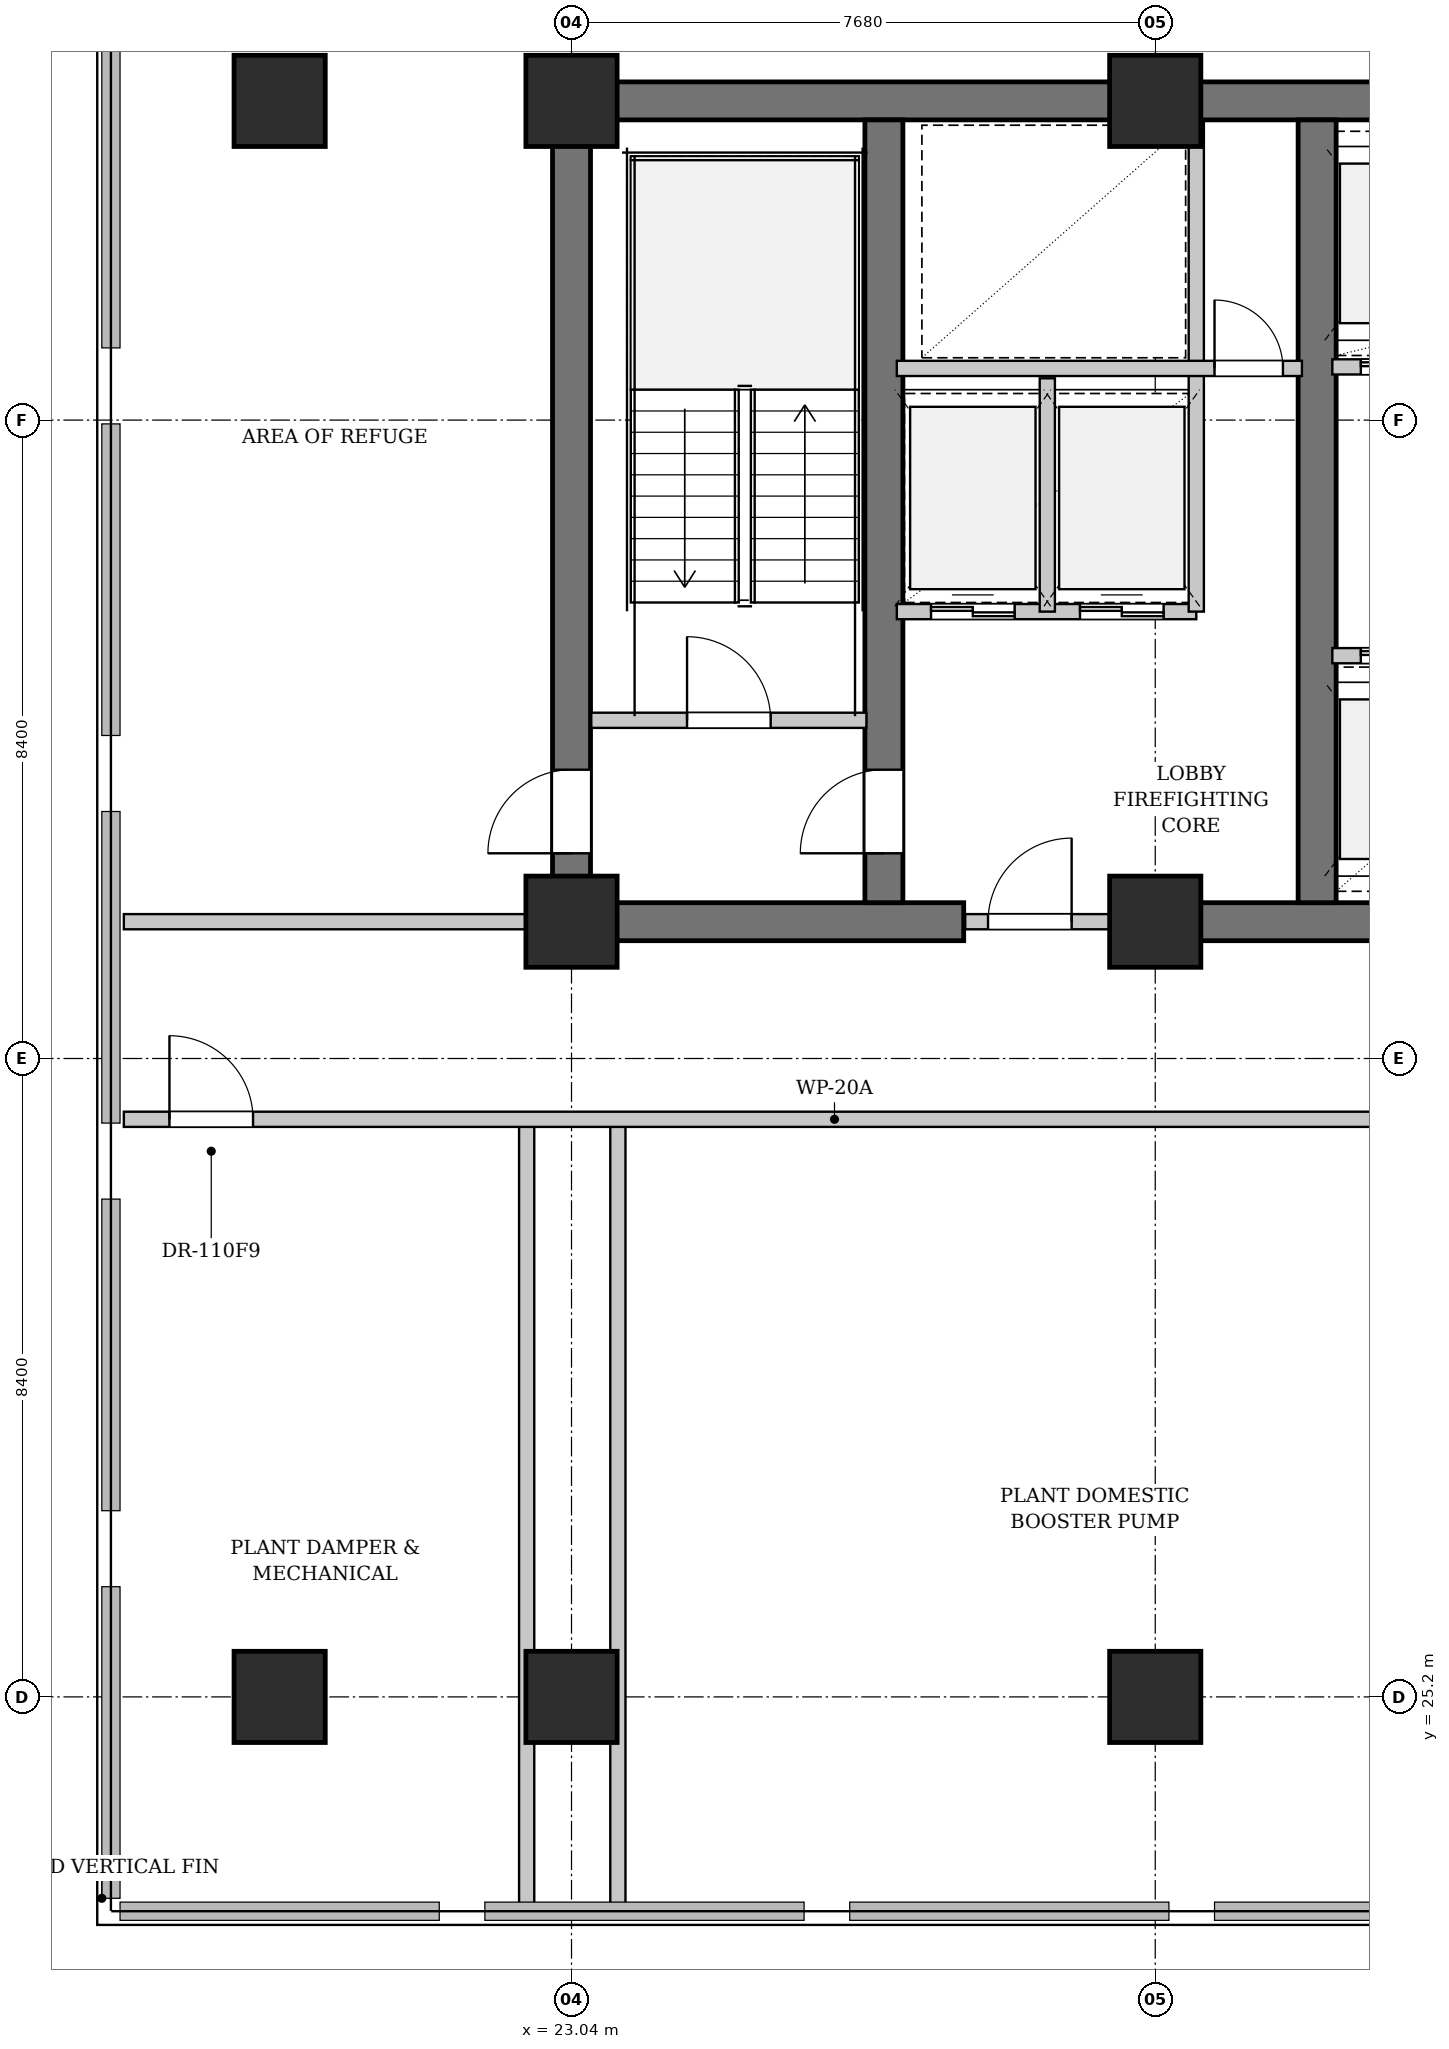
"""IFC4 building model, lengths in metres.
Left out: names, types, materials, properties, quantities, classifications, styles, units other than length and angle.
Written with IfcOpenShell. Run it as: python <this file> out.ifc"""

import sys

from ifc_helpers import new_model, si_unit, direction, frame, frame_2d, origin, origin_2d, place, context, subcontext, project, spatial, rectangle, extrude, element, fill, save


model = new_model("IFC4")
c1 = context("Model", 3, precision=1e-05, world=origin(), true_north=direction((0.0, 1.0)))
c2 = subcontext(c1, "Body", "Model", "MODEL_VIEW")
j1 = project(units=[si_unit("LENGTHUNIT", "METRE"), si_unit("PLANEANGLEUNIT", "RADIAN")], contexts=[c1])
p1 = place(None, origin())
s1 = spatial("IfcSite", under=j1, at=p1, CompositionType="ELEMENT")
p2 = place(p1, origin())
s2 = spatial("IfcBuilding", under=s1, at=p2, CompositionType="ELEMENT")
p3 = place(p2, frame((0.0, 0.0, 85.8)))
s3 = spatial("IfcBuildingStorey", under=s2, at=p3, CompositionType="ELEMENT", Elevation=85.8)
p4 = place(p3, frame((22.79, 46.2, 0.0), z_axis=(0.0, 0.0, 1.0), x_axis=(1.0, 0.0, 0.0)))
e1 = element("IfcWall", 1, at=p4, inside=s3, PredefinedType="SHEAR", context=c2, shape_type="SweptSolid", body=[
    extrude(rectangle(XDim=31.22, YDim=0.5, at=frame_2d((15.61, 0.0))), origin(), (0.0, 0.0, 1.0), 3.48),
])
p5 = place(p3, frame((22.79, 35.4, 0.0), z_axis=(0.0, 0.0, 1.0), x_axis=(1.0, 0.0, 0.0)))
e2 = element("IfcWall", 2, at=p5, inside=s3, PredefinedType="SHEAR", context=c2, shape_type="SweptSolid", body=[
    extrude(rectangle(XDim=5.41, YDim=0.5, at=frame_2d((2.705, 0.0))), origin(), (0.0, 0.0, 1.0), 3.48),
])
p6 = place(p3, frame((30.72, 35.4, 0.0), z_axis=(0.0, 0.0, 1.0), x_axis=(1.0, 0.0, 0.0)))
e3 = element("IfcWall", 3, at=p6, inside=s3, PredefinedType="SHEAR", context=c2, shape_type="SweptSolid", body=[
    extrude(rectangle(XDim=4.88, YDim=0.5, at=frame_2d((2.44, 0.0))), origin(), (0.0, 0.0, 1.0), 3.48),
])
p7 = place(p3, frame((23.04, 35.65, 0.0), z_axis=(0.0, 0.0, 1.0), x_axis=(0.0, 1.0, 0.0)))
e4 = element("IfcWall", 4, at=p7, inside=s3, PredefinedType="SHEAR", context=c2, shape_type="SweptSolid", body=[
    extrude(rectangle(XDim=10.3, YDim=0.5, at=frame_2d((5.15, 0.0))), origin(), (0.0, 0.0, 1.0), 3.48),
])
p8 = place(p7, frame((0.65, 0.0, 0.0)))
e5 = element("IfcOpeningElement", 5, at=p8, cuts=e4, PredefinedType="OPENING", context=c2, shape_type="SweptSolid", body=[
    extrude(rectangle(XDim=1.1, YDim=2.15, at=frame_2d((0.55, 1.075))), frame((0.0, 0.26, 0.0), z_axis=(0.0, -1.0, 0.0), x_axis=(1.0, 0.0, 0.0)), (0.0, 0.0, 1.0), 0.52),
])
p9 = place(p3, frame((27.15, 35.65, 0.0), z_axis=(0.0, 0.0, 1.0), x_axis=(0.0, 1.0, 0.0)))
e6 = element("IfcWall", 6, at=p9, inside=s3, PredefinedType="SHEAR", context=c2, shape_type="SweptSolid", body=[
    extrude(rectangle(XDim=10.3, YDim=0.5, at=frame_2d((5.15, 0.0))), origin(), (0.0, 0.0, 1.0), 3.48),
])
p10 = place(p9, frame((0.65, 0.0, 0.0)))
e7 = element("IfcOpeningElement", 7, at=p10, cuts=e6, PredefinedType="OPENING", context=c2, shape_type="SweptSolid", body=[
    extrude(rectangle(XDim=1.1, YDim=2.15, at=frame_2d((0.55, 1.075))), frame((0.0, 0.26, 0.0), z_axis=(0.0, -1.0, 0.0), x_axis=(1.0, 0.0, 0.0)), (0.0, 0.0, 1.0), 0.52),
])
p11 = place(p3, frame((32.85, 35.65, 0.0), z_axis=(0.0, 0.0, 1.0), x_axis=(0.0, 1.0, 0.0)))
e8 = element("IfcWall", 8, at=p11, inside=s3, PredefinedType="SHEAR", context=c2, shape_type="SweptSolid", body=[
    extrude(rectangle(XDim=10.3, YDim=0.5, at=frame_2d((5.15, 0.0))), origin(), (0.0, 0.0, 1.0), 3.48),
])
for number, where, z_axis, x_axis in (
    (9, (23.04, 35.4, 0.0), (0.0, 0.0, 1.0), (1.0, 0.0, 0.0)),
    (10, (23.04, 46.2, 0.0), (0.0, 0.0, 1.0), (1.0, 0.0, 0.0)),
    (11, (23.04, 25.2, 0.0), (0.0, 0.0, 1.0), (1.0, 0.0, 0.0)),
    (12, (30.72, 35.4, 0.0), (0.0, 0.0, 1.0), (1.0, 0.0, 0.0)),
    (13, (30.72, 46.2, 0.0), (0.0, 0.0, 1.0), (1.0, 0.0, 0.0)),
    (14, (30.72, 25.2, 0.0), (0.0, 0.0, 1.0), (1.0, 0.0, 0.0)),
    (15, (19.2, 25.2, 0.0), (0.0, 0.0, 1.0), (1.0, 0.0, 0.0)),
    (16, (19.2, 46.2, 0.0), (0.0, 0.0, 1.0), (1.0, 0.0, 0.0)),
):
    element("IfcColumn", number, at=place(p3, frame(where, z_axis=z_axis, x_axis=x_axis)), inside=s3, PredefinedType="COLUMN", context=c2, shape_type="SweptSolid", body=[
        extrude(rectangle(XDim=1.2, YDim=1.2, at=origin_2d()), origin(), (0.0, 0.0, 1.0), 3.9),
    ])
p12 = place(p3, frame((23.3, 38.05, 0.0), z_axis=(0.0, 0.0, 1.0), x_axis=(1.0, 0.0, 0.0)))
e17 = element("IfcWall", 17, at=p12, inside=s3, PredefinedType="PARTITIONING", context=c2, shape_type="SweptSolid", body=[
    extrude(rectangle(XDim=3.62, YDim=0.2, at=frame_2d((1.81, 0.0))), origin(), (0.0, 0.0, 1.0), 3.48),
])
p13 = place(p12, frame((1.26, 0.0, 0.0)))
e18 = element("IfcOpeningElement", 18, at=p13, cuts=e17, PredefinedType="OPENING", context=c2, shape_type="SweptSolid", body=[
    extrude(rectangle(XDim=1.1, YDim=2.15, at=frame_2d((0.55, 1.075))), frame((0.0, 0.11, 0.0), z_axis=(0.0, -1.0, 0.0), x_axis=(1.0, 0.0, 0.0)), (0.0, 0.0, 1.0), 0.22),
])
p14 = place(p3, frame((28.22, 35.4, 0.0), z_axis=(0.0, 0.0, 1.0), x_axis=(1.0, 0.0, 0.0)))
e19 = element("IfcWall", 19, at=p14, inside=s3, PredefinedType="PARTITIONING", context=c2, shape_type="SweptSolid", body=[
    extrude(rectangle(XDim=2.5, YDim=0.2, at=frame_2d((1.25, 0.0))), origin(), (0.0, 0.0, 1.0), 2.565),
])
p15 = place(p14, frame((0.3, 0.0, 0.0)))
e20 = element("IfcOpeningElement", 20, at=p15, cuts=e19, PredefinedType="OPENING", context=c2, shape_type="SweptSolid", body=[
    extrude(rectangle(XDim=1.1, YDim=2.15, at=frame_2d((0.55, 1.075))), frame((0.0, 0.11, 0.0), z_axis=(0.0, -1.0, 0.0), x_axis=(1.0, 0.0, 0.0)), (0.0, 0.0, 1.0), 0.22),
])
p16 = place(p3, frame((27.32, 39.48, 0.0), z_axis=(0.0, 0.0, 1.0), x_axis=(1.0, 0.0, 0.0)))
e21 = element("IfcWall", 21, at=p16, inside=s3, PredefinedType="PARTITIONING", context=c2, shape_type="SweptSolid", body=[
    extrude(rectangle(XDim=3.94, YDim=0.2, at=frame_2d((1.97, 0.0))), origin(), (0.0, 0.0, 1.0), 3.48),
])
p17 = place(p16, frame((0.45, 0.0, 0.0)))
e22 = element("IfcOpeningElement", 22, at=p17, cuts=e21, PredefinedType="OPENING", context=c2, shape_type="SweptSolid", body=[
    extrude(rectangle(XDim=1.1, YDim=2.2, at=frame_2d((0.55, 1.1))), frame((0.0, 0.11, 0.0), z_axis=(0.0, -1.0, 0.0), x_axis=(1.0, 0.0, 0.0)), (0.0, 0.0, 1.0), 0.22),
])
p18 = place(p16, frame((2.41, 0.0, 0.0)))
e23 = element("IfcOpeningElement", 23, at=p18, cuts=e21, PredefinedType="OPENING", context=c2, shape_type="SweptSolid", body=[
    extrude(rectangle(XDim=1.1, YDim=2.2, at=frame_2d((0.55, 1.1))), frame((0.0, 0.11, 0.0), z_axis=(0.0, -1.0, 0.0), x_axis=(1.0, 0.0, 0.0)), (0.0, 0.0, 1.0), 0.22),
])
p19 = place(p3, frame((29.3, 39.48, 0.0), z_axis=(0.0, 0.0, 1.0), x_axis=(0.0, 1.0, 0.0)))
e24 = element("IfcWall", 24, at=p19, inside=s3, PredefinedType="PARTITIONING", context=c2, shape_type="SweptSolid", body=[
    extrude(rectangle(XDim=3.07, YDim=0.2, at=frame_2d((1.535, 0.0))), origin(), (0.0, 0.0, 1.0), 3.48),
])
p20 = place(p3, frame((31.26, 39.48, 0.0), z_axis=(0.0, 0.0, 1.0), x_axis=(0.0, 1.0, 0.0)))
e25 = element("IfcWall", 25, at=p20, inside=s3, PredefinedType="PARTITIONING", context=c2, shape_type="SweptSolid", body=[
    extrude(rectangle(XDim=6.44, YDim=0.2, at=frame_2d((3.22, 0.0))), origin(), (0.0, 0.0, 1.0), 3.48),
])
p21 = place(p3, frame((27.32, 42.68, 0.0), z_axis=(0.0, 0.0, 1.0), x_axis=(1.0, 0.0, 0.0)))
e26 = element("IfcWall", 26, at=p21, inside=s3, PredefinedType="PARTITIONING", context=c2, shape_type="SweptSolid", body=[
    extrude(rectangle(XDim=5.33, YDim=0.2, at=frame_2d((2.665, 0.0))), origin(), (0.0, 0.0, 1.0), 3.48),
])
p22 = place(p21, frame((4.18, 0.0, 0.0)))
e27 = element("IfcOpeningElement", 27, at=p22, cuts=e26, PredefinedType="OPENING", context=c2, shape_type="SweptSolid", body=[
    extrude(rectangle(XDim=0.9, YDim=2.15, at=frame_2d((0.45, 1.075))), frame((0.0, 0.11, 0.0), z_axis=(0.0, -1.0, 0.0), x_axis=(1.0, 0.0, 0.0)), (0.0, 0.0, 1.0), 0.22),
])
p23 = place(p3, frame((33.05, 38.9, 0.0), z_axis=(0.0, 0.0, 1.0), x_axis=(1.0, 0.0, 0.0)))
e28 = element("IfcWall", 28, at=p23, inside=s3, PredefinedType="PARTITIONING", context=c2, shape_type="SweptSolid", body=[
    extrude(rectangle(XDim=3.57, YDim=0.2, at=frame_2d((1.785, 0.0))), origin(), (0.0, 0.0, 1.0), 3.48),
])
p24 = place(p23, frame((0.375, 0.0, 0.0)))
e29 = element("IfcOpeningElement", 29, at=p24, cuts=e28, PredefinedType="OPENING", context=c2, shape_type="SweptSolid", body=[
    extrude(rectangle(XDim=1.0, YDim=2.2, at=frame_2d((0.5, 1.1))), frame((0.0, 0.11, 0.0), z_axis=(0.0, -1.0, 0.0), x_axis=(1.0, 0.0, 0.0)), (0.0, 0.0, 1.0), 0.22),
])
p25 = place(p23, frame((2.125, 0.0, 0.0)))
e30 = element("IfcOpeningElement", 30, at=p25, cuts=e28, PredefinedType="OPENING", context=c2, shape_type="SweptSolid", body=[
    extrude(rectangle(XDim=1.0, YDim=2.2, at=frame_2d((0.5, 1.1))), frame((0.0, 0.11, 0.0), z_axis=(0.0, -1.0, 0.0), x_axis=(1.0, 0.0, 0.0)), (0.0, 0.0, 1.0), 0.22),
])
p26 = place(p3, frame((33.05, 42.7, 0.0), z_axis=(0.0, 0.0, 1.0), x_axis=(1.0, 0.0, 0.0)))
e31 = element("IfcWall", 31, at=p26, inside=s3, PredefinedType="PARTITIONING", context=c2, shape_type="SweptSolid", body=[
    extrude(rectangle(XDim=3.57, YDim=0.2, at=frame_2d((1.785, 0.0))), origin(), (0.0, 0.0, 1.0), 3.48),
])
p27 = place(p26, frame((0.375, 0.0, 0.0)))
e32 = element("IfcOpeningElement", 32, at=p27, cuts=e31, PredefinedType="OPENING", context=c2, shape_type="SweptSolid", body=[
    extrude(rectangle(XDim=1.0, YDim=2.2, at=frame_2d((0.5, 1.1))), frame((0.0, 0.11, 0.0), z_axis=(0.0, -1.0, 0.0), x_axis=(1.0, 0.0, 0.0)), (0.0, 0.0, 1.0), 0.22),
])
p28 = place(p26, frame((2.125, 0.0, 0.0)))
e33 = element("IfcOpeningElement", 33, at=p28, cuts=e31, PredefinedType="OPENING", context=c2, shape_type="SweptSolid", body=[
    extrude(rectangle(XDim=1.0, YDim=2.2, at=frame_2d((0.5, 1.1))), frame((0.0, 0.11, 0.0), z_axis=(0.0, -1.0, 0.0), x_axis=(1.0, 0.0, 0.0)), (0.0, 0.0, 1.0), 0.22),
])
p29 = place(p3, frame((17.15, 35.4, 0.0), z_axis=(0.0, 0.0, 1.0), x_axis=(1.0, 0.0, 0.0)))
e34 = element("IfcWall", 34, at=p29, inside=s3, PredefinedType="PARTITIONING", context=c2, shape_type="SweptSolid", body=[
    extrude(rectangle(XDim=5.6, YDim=0.2, at=frame_2d((2.8, 0.0))), origin(), (0.0, 0.0, 1.0), 3.48),
])
p30 = place(p3, frame((22.45, 22.38, 0.0), z_axis=(0.0, 0.0, 1.0), x_axis=(0.0, 1.0, 0.0)))
e35 = element("IfcWall", 35, at=p30, inside=s3, PredefinedType="PARTITIONING", context=c2, shape_type="SweptSolid", body=[
    extrude(rectangle(XDim=10.42, YDim=0.2, at=frame_2d((5.21, 0.0))), origin(), (0.0, 0.0, 1.0), 2.275),
])
p31 = place(p3, frame((23.65, 22.38, 0.0), z_axis=(0.0, 0.0, 1.0), x_axis=(0.0, 1.0, 0.0)))
e36 = element("IfcWall", 36, at=p31, inside=s3, PredefinedType="PARTITIONING", context=c2, shape_type="SweptSolid", body=[
    extrude(rectangle(XDim=10.42, YDim=0.2, at=frame_2d((5.21, 0.0))), origin(), (0.0, 0.0, 1.0), 3.48),
])
p32 = place(p3, frame((17.15, 32.8, 0.0), z_axis=(0.0, 0.0, 1.0), x_axis=(1.0, 0.0, 0.0)))
e37 = element("IfcWall", 37, at=p32, inside=s3, PredefinedType="PARTITIONING", context=c2, shape_type="SweptSolid", body=[
    extrude(rectangle(XDim=42.5, YDim=0.2, at=frame_2d((21.25, 0.0))), origin(), (0.0, 0.0, 1.0), 2.275),
])
p33 = place(p32, frame((0.6, 0.0, 0.0)))
e38 = element("IfcOpeningElement", 38, at=p33, cuts=e37, PredefinedType="OPENING", context=c2, shape_type="SweptSolid", body=[
    extrude(rectangle(XDim=1.1, YDim=2.15, at=frame_2d((0.55, 1.075))), frame((0.0, 0.11, 0.0), z_axis=(0.0, -1.0, 0.0), x_axis=(1.0, 0.0, 0.0)), (0.0, 0.0, 1.0), 0.22),
])
p34 = place(p32, frame((16.862, 0.0, 0.0)))
e39 = element("IfcOpeningElement", 39, at=p34, cuts=e37, PredefinedType="OPENING", context=c2, shape_type="SweptSolid", body=[
    extrude(rectangle(XDim=1.1, YDim=2.15, at=frame_2d((0.55, 1.075))), frame((0.0, 0.11, 0.0), z_axis=(0.0, -1.0, 0.0), x_axis=(1.0, 0.0, 0.0)), (0.0, 0.0, 1.0), 0.22),
])
p35 = place(p32, frame((32.235, 0.0, 0.0)))
e40 = element("IfcOpeningElement", 40, at=p35, cuts=e37, PredefinedType="OPENING", context=c2, shape_type="SweptSolid", body=[
    extrude(rectangle(XDim=1.1, YDim=2.15, at=frame_2d((0.55, 1.075))), frame((0.0, 0.11, 0.0), z_axis=(0.0, -1.0, 0.0), x_axis=(1.0, 0.0, 0.0)), (0.0, 0.0, 1.0), 0.22),
])
p36 = place(p32, frame((40.8, 0.0, 0.0)))
e41 = element("IfcOpeningElement", 41, at=p36, cuts=e37, PredefinedType="OPENING", context=c2, shape_type="SweptSolid", body=[
    extrude(rectangle(XDim=1.1, YDim=2.15, at=frame_2d((0.55, 1.075))), frame((0.0, 0.11, 0.0), z_axis=(0.0, -1.0, 0.0), x_axis=(1.0, 0.0, 0.0)), (0.0, 0.0, 1.0), 0.22),
])
p37 = place(p13, origin())
e42 = element("IfcDoor", 42, at=p37, inside=s3, OperationType="SINGLE_SWING_LEFT", PredefinedType="DOOR", context=c2, shape_type="SweptSolid", body=[
    extrude(rectangle(XDim=1.1, YDim=2.15, at=frame_2d((0.55, 1.075))), frame((0.0, 0.025, 0.0), z_axis=(0.0, -1.0, 0.0), x_axis=(1.0, 0.0, 0.0)), (0.0, 0.0, 1.0), 0.05),
])
fill(e18, e42)
p38 = place(p15, origin())
e43 = element("IfcDoor", 43, at=p38, inside=s3, OperationType="SINGLE_SWING_RIGHT", PredefinedType="DOOR", context=c2, shape_type="SweptSolid", body=[
    extrude(rectangle(XDim=1.1, YDim=2.15, at=frame_2d((0.55, 1.075))), frame((0.0, 0.025, 0.0), z_axis=(0.0, -1.0, 0.0), x_axis=(1.0, 0.0, 0.0)), (0.0, 0.0, 1.0), 0.05),
])
fill(e20, e43)
p39 = place(p17, origin())
e44 = element("IfcDoor", 44, at=p39, inside=s3, OperationType="DOUBLE_DOOR_SLIDING", PredefinedType="DOOR", context=c2, shape_type="SweptSolid", body=[
    extrude(rectangle(XDim=1.1, YDim=2.2, at=frame_2d((0.55, 1.1))), frame((0.0, 0.025, 0.0), z_axis=(0.0, -1.0, 0.0), x_axis=(1.0, 0.0, 0.0)), (0.0, 0.0, 1.0), 0.05),
])
fill(e22, e44)
p40 = place(p18, origin())
e45 = element("IfcDoor", 45, at=p40, inside=s3, OperationType="DOUBLE_DOOR_SLIDING", PredefinedType="DOOR", context=c2, shape_type="SweptSolid", body=[
    extrude(rectangle(XDim=1.1, YDim=2.2, at=frame_2d((0.55, 1.1))), frame((0.0, 0.025, 0.0), z_axis=(0.0, -1.0, 0.0), x_axis=(1.0, 0.0, 0.0)), (0.0, 0.0, 1.0), 0.05),
])
fill(e23, e45)
p41 = place(p22, origin())
e46 = element("IfcDoor", 46, at=p41, inside=s3, OperationType="SINGLE_SWING_LEFT", PredefinedType="DOOR", context=c2, shape_type="SweptSolid", body=[
    extrude(rectangle(XDim=0.9, YDim=2.15, at=frame_2d((0.45, 1.075))), frame((0.0, 0.025, 0.0), z_axis=(0.0, -1.0, 0.0), x_axis=(1.0, 0.0, 0.0)), (0.0, 0.0, 1.0), 0.05),
])
fill(e27, e46)
p42 = place(p24, origin())
e47 = element("IfcDoor", 47, at=p42, inside=s3, OperationType="DOUBLE_DOOR_SLIDING", PredefinedType="DOOR", context=c2, shape_type="SweptSolid", body=[
    extrude(rectangle(XDim=1.0, YDim=2.2, at=frame_2d((0.5, 1.1))), frame((0.0, 0.025, 0.0), z_axis=(0.0, -1.0, 0.0), x_axis=(1.0, 0.0, 0.0)), (0.0, 0.0, 1.0), 0.05),
])
fill(e29, e47)
p43 = place(p27, origin())
e48 = element("IfcDoor", 48, at=p43, inside=s3, OperationType="DOUBLE_DOOR_SLIDING", PredefinedType="DOOR", context=c2, shape_type="SweptSolid", body=[
    extrude(rectangle(XDim=1.0, YDim=2.2, at=frame_2d((0.5, 1.1))), frame((0.0, 0.025, 0.0), z_axis=(0.0, -1.0, 0.0), x_axis=(1.0, 0.0, 0.0)), (0.0, 0.0, 1.0), 0.05),
])
fill(e32, e48)
p44 = place(p33, origin())
e49 = element("IfcDoor", 49, at=p44, inside=s3, OperationType="SINGLE_SWING_LEFT", PredefinedType="DOOR", context=c2, shape_type="SweptSolid", body=[
    extrude(rectangle(XDim=1.1, YDim=2.15, at=frame_2d((0.55, 1.075))), frame((0.0, 0.025, 0.0), z_axis=(0.0, -1.0, 0.0), x_axis=(1.0, 0.0, 0.0)), (0.0, 0.0, 1.0), 0.05),
])
fill(e38, e49)
p45 = place(p10, origin())
e50 = element("IfcDoor", 50, at=p45, inside=s3, OperationType="SINGLE_SWING_LEFT", PredefinedType="DOOR", context=c2, shape_type="SweptSolid", body=[
    extrude(rectangle(XDim=1.1, YDim=2.15, at=frame_2d((0.55, 1.075))), frame((0.0, 0.025, 0.0), z_axis=(0.0, -1.0, 0.0), x_axis=(1.0, 0.0, 0.0)), (0.0, 0.0, 1.0), 0.05),
])
fill(e7, e50)
p46 = place(p8, origin())
e51 = element("IfcDoor", 51, at=p46, inside=s3, OperationType="SINGLE_SWING_LEFT", PredefinedType="DOOR", context=c2, shape_type="SweptSolid", body=[
    extrude(rectangle(XDim=1.1, YDim=2.15, at=frame_2d((0.55, 1.075))), frame((0.0, 0.025, 0.0), z_axis=(0.0, -1.0, 0.0), x_axis=(1.0, 0.0, 0.0)), (0.0, 0.0, 1.0), 0.05),
])
fill(e5, e51)
save(model, sys.argv[1])
